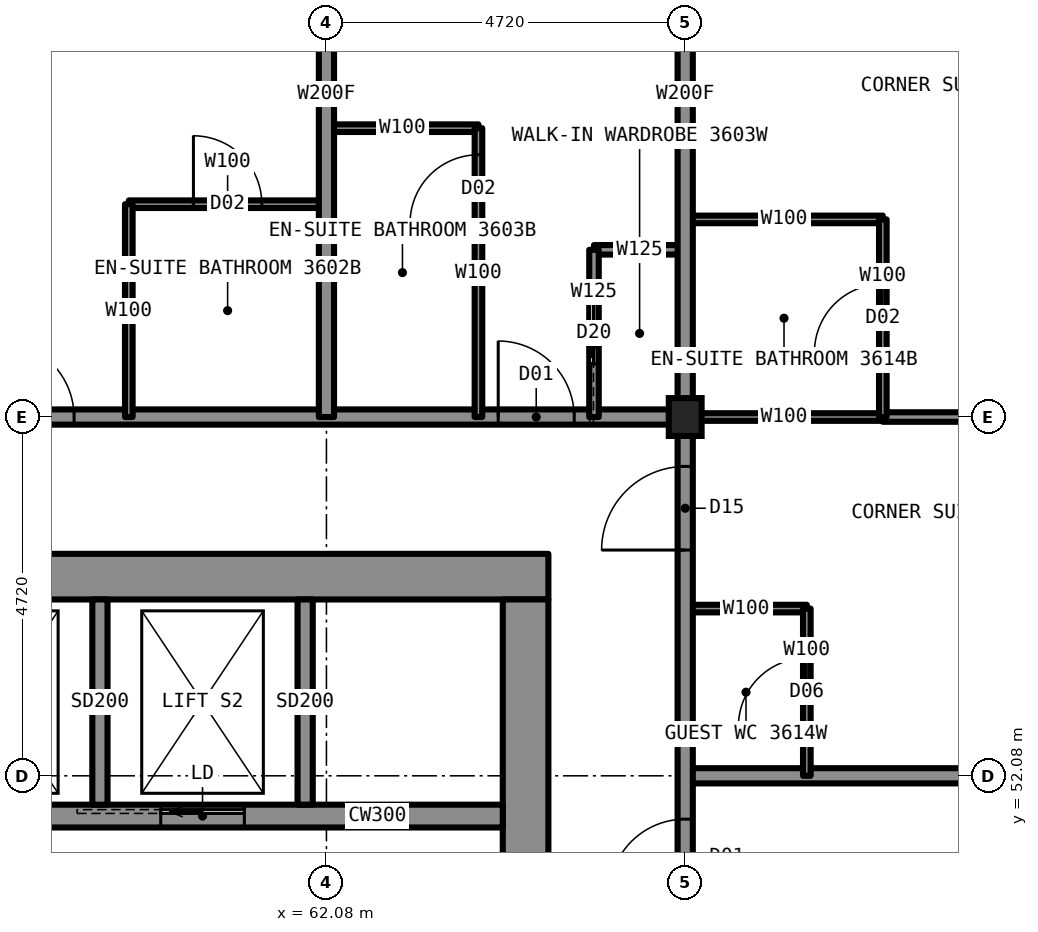
"""IFC4 building model, lengths in metres.
Left out: names, types, materials, properties, quantities, classifications, styles, units other than length and angle.
Written with IfcOpenShell. Run it as: python <this file> out.ifc"""

import sys

from ifc_helpers import new_model, si_unit, direction, frame, frame_2d, origin, origin_2d, place, context, subcontext, project, spatial, rectangle, i_section, extrude, element, fill, save


model = new_model("IFC4")
c1 = context("Model", 3, precision=1e-05, world=origin(), true_north=direction((0.0, 1.0)))
c2 = subcontext(c1, "Body", "Model", "MODEL_VIEW")
j1 = project(units=[si_unit("LENGTHUNIT", "METRE"), si_unit("PLANEANGLEUNIT", "RADIAN")], contexts=[c1])
p1 = place(None, origin())
s1 = spatial("IfcSite", under=j1, at=p1, CompositionType="ELEMENT")
p2 = place(p1, origin())
s2 = spatial("IfcBuilding", under=s1, at=p2, CompositionType="ELEMENT")
p3 = place(p2, frame((0.0, 0.0, 135.4)))
s3 = spatial("IfcBuildingStorey", under=s2, at=p3, CompositionType="ELEMENT", Elevation=135.4)
p4 = place(p3, frame((66.8, 56.8, 0.0), z_axis=(0.0, 0.0, 1.0), x_axis=(1.0, 0.0, 0.0)))
e1 = element("IfcColumn", 1, at=p4, inside=s3, PredefinedType="COLUMN", context=c2, shape_type="SweptSolid", body=[
    extrude(i_section(OverallWidth=0.432, OverallDepth=0.498, WebThickness=0.056, FlangeThickness=0.089, at=origin_2d()), origin(), (0.0, 0.0, 1.0), 3.5),
])
p5 = place(p3, frame((45.0, 54.7, 0.0), z_axis=(0.0, 0.0, 1.0), x_axis=(1.0, 0.0, 0.0)))
e2 = element("IfcWall", 2, at=p5, inside=s3, PredefinedType="SHEAR", context=c2, shape_type="SweptSolid", body=[
    extrude(rectangle(XDim=20.0, YDim=0.6, at=frame_2d((10.0, 0.0))), origin(), (0.0, 0.0, 1.0), 3.5),
])
p6 = place(p3, frame((64.7, 35.6, 0.0), z_axis=(0.0, 0.0, 1.0), x_axis=(0.0, 1.0, 0.0)))
e3 = element("IfcWall", 3, at=p6, inside=s3, PredefinedType="SHEAR", context=c2, shape_type="SweptSolid", body=[
    extrude(rectangle(XDim=18.8, YDim=0.6, at=frame_2d((9.4, 0.0))), origin(), (0.0, 0.0, 1.0), 3.5),
])
p7 = place(p6, frame((13.4, 0.0, 0.0)))
e4 = element("IfcOpeningElement", 4, at=p7, cuts=e3, PredefinedType="OPENING", context=c2, shape_type="SweptSolid", body=[
    extrude(rectangle(XDim=1.8, YDim=2.2, at=frame_2d((0.9, 1.1))), frame((0.0, 0.31, 0.0), z_axis=(0.0, -1.0, 0.0), x_axis=(1.0, 0.0, 0.0)), (0.0, 0.0, 1.0), 0.62),
])
p8 = place(p6, frame((3.6, 0.0, 0.0)))
e5 = element("IfcOpeningElement", 5, at=p8, cuts=e3, PredefinedType="OPENING", context=c2, shape_type="SweptSolid", body=[
    extrude(rectangle(XDim=1.8, YDim=2.2, at=frame_2d((0.9, 1.1))), frame((0.0, 0.31, 0.0), z_axis=(0.0, -1.0, 0.0), x_axis=(1.0, 0.0, 0.0)), (0.0, 0.0, 1.0), 0.62),
])
p9 = place(p3, frame((45.6, 51.55, 0.0), z_axis=(0.0, 0.0, 1.0), x_axis=(1.0, 0.0, 0.0)))
e6 = element("IfcWall", 6, at=p9, inside=s3, PredefinedType="SHEAR", context=c2, shape_type="SweptSolid", body=[
    extrude(rectangle(XDim=18.8, YDim=0.3, at=frame_2d((9.4, 0.0))), origin(), (0.0, 0.0, 1.0), 3.5),
])
p10 = place(p9, frame((0.7, 0.0, 0.0)))
e7 = element("IfcOpeningElement", 7, at=p10, cuts=e6, PredefinedType="OPENING", context=c2, shape_type="SweptSolid", body=[
    extrude(rectangle(XDim=1.1, YDim=2.2, at=frame_2d((0.55, 1.1))), frame((0.0, 0.16, 0.0), z_axis=(0.0, -1.0, 0.0), x_axis=(1.0, 0.0, 0.0)), (0.0, 0.0, 1.0), 0.32),
])
p11 = place(p9, frame((3.4, 0.0, 0.0)))
e8 = element("IfcOpeningElement", 8, at=p11, cuts=e6, PredefinedType="OPENING", context=c2, shape_type="SweptSolid", body=[
    extrude(rectangle(XDim=1.1, YDim=2.2, at=frame_2d((0.55, 1.1))), frame((0.0, 0.16, 0.0), z_axis=(0.0, -1.0, 0.0), x_axis=(1.0, 0.0, 0.0)), (0.0, 0.0, 1.0), 0.32),
])
p12 = place(p9, frame((6.1, 0.0, 0.0)))
e9 = element("IfcOpeningElement", 9, at=p12, cuts=e6, PredefinedType="OPENING", context=c2, shape_type="SweptSolid", body=[
    extrude(rectangle(XDim=1.1, YDim=2.2, at=frame_2d((0.55, 1.1))), frame((0.0, 0.16, 0.0), z_axis=(0.0, -1.0, 0.0), x_axis=(1.0, 0.0, 0.0)), (0.0, 0.0, 1.0), 0.32),
])
p13 = place(p9, frame((8.8, 0.0, 0.0)))
e10 = element("IfcOpeningElement", 10, at=p13, cuts=e6, PredefinedType="OPENING", context=c2, shape_type="SweptSolid", body=[
    extrude(rectangle(XDim=1.1, YDim=2.2, at=frame_2d((0.55, 1.1))), frame((0.0, 0.16, 0.0), z_axis=(0.0, -1.0, 0.0), x_axis=(1.0, 0.0, 0.0)), (0.0, 0.0, 1.0), 0.32),
])
p14 = place(p9, frame((11.6, 0.0, 0.0)))
e11 = element("IfcOpeningElement", 11, at=p14, cuts=e6, PredefinedType="OPENING", context=c2, shape_type="SweptSolid", body=[
    extrude(rectangle(XDim=1.1, YDim=2.2, at=frame_2d((0.55, 1.1))), frame((0.0, 0.16, 0.0), z_axis=(0.0, -1.0, 0.0), x_axis=(1.0, 0.0, 0.0)), (0.0, 0.0, 1.0), 0.32),
])
p15 = place(p9, frame((14.3, 0.0, 0.0)))
e12 = element("IfcOpeningElement", 12, at=p15, cuts=e6, PredefinedType="OPENING", context=c2, shape_type="SweptSolid", body=[
    extrude(rectangle(XDim=1.1, YDim=2.2, at=frame_2d((0.55, 1.1))), frame((0.0, 0.16, 0.0), z_axis=(0.0, -1.0, 0.0), x_axis=(1.0, 0.0, 0.0)), (0.0, 0.0, 1.0), 0.32),
])
p16 = place(p3, frame((66.8, 56.8, 0.0), z_axis=(0.0, 0.0, 1.0), x_axis=(1.0, 0.0, 0.0)))
e13 = element("IfcWall", 13, at=p16, inside=s3, PredefinedType="PARTITIONING", context=c2, shape_type="SweptSolid", body=[
    extrude(rectangle(XDim=2.6, YDim=0.1, at=frame_2d((1.3, 0.0))), origin(), (0.0, 0.0, 1.0), 2.573),
])
p17 = place(p3, frame((43.2, 56.8, 0.0), z_axis=(0.0, 0.0, 1.0), x_axis=(1.0, 0.0, 0.0)))
e14 = element("IfcWall", 14, at=p17, inside=s3, PredefinedType="PARTITIONING", context=c2, shape_type="SweptSolid", body=[
    extrude(rectangle(XDim=23.6, YDim=0.2, at=frame_2d((11.8, 0.0))), origin(), (0.0, 0.0, 1.0), 3.33),
])
p18 = place(p17, frame((1.85, 0.0, 0.0)))
e15 = element("IfcOpeningElement", 15, at=p18, cuts=e14, PredefinedType="OPENING", context=c2, shape_type="SweptSolid", body=[
    extrude(rectangle(XDim=1.1, YDim=2.2, at=frame_2d((0.55, 1.1))), frame((0.0, 0.11, 0.0), z_axis=(0.0, -1.0, 0.0), x_axis=(1.0, 0.0, 0.0)), (0.0, 0.0, 1.0), 0.22),
])
p19 = place(p17, frame((14.56, 0.0, 0.0)))
e16 = element("IfcOpeningElement", 16, at=p19, cuts=e14, PredefinedType="OPENING", context=c2, shape_type="SweptSolid", body=[
    extrude(rectangle(XDim=1.0, YDim=2.2, at=frame_2d((0.5, 1.1))), frame((0.0, 0.11, 0.0), z_axis=(0.0, -1.0, 0.0), x_axis=(1.0, 0.0, 0.0)), (0.0, 0.0, 1.0), 0.22),
])
p20 = place(p17, frame((21.14, 0.0, 0.0)))
e17 = element("IfcOpeningElement", 17, at=p20, cuts=e14, PredefinedType="OPENING", context=c2, shape_type="SweptSolid", body=[
    extrude(rectangle(XDim=1.0, YDim=2.2, at=frame_2d((0.5, 1.1))), frame((0.0, 0.11, 0.0), z_axis=(0.0, -1.0, 0.0), x_axis=(1.0, 0.0, 0.0)), (0.0, 0.0, 1.0), 0.22),
])
p21 = place(p3, frame((69.4, 56.8, 0.0), z_axis=(0.0, 0.0, 1.0), x_axis=(1.0, 0.0, 0.0)))
e18 = element("IfcWall", 18, at=p21, inside=s3, PredefinedType="PARTITIONING", context=c2, shape_type="SweptSolid", body=[
    extrude(rectangle(XDim=5.9, YDim=0.125, at=frame_2d((2.95, 0.0))), origin(), (0.0, 0.0, 1.0), 2.573),
])
p22 = place(p21, frame((1.15, 0.0, 0.0)))
e19 = element("IfcOpeningElement", 19, at=p22, cuts=e18, PredefinedType="OPENING", context=c2, shape_type="SweptSolid", body=[
    extrude(rectangle(XDim=0.9, YDim=2.2, at=frame_2d((0.45, 1.1))), frame((0.0, 0.073, 0.0), z_axis=(0.0, -1.0, 0.0), x_axis=(1.0, 0.0, 0.0)), (0.0, 0.0, 1.0), 0.145),
])
p23 = place(p3, frame((65.6, 59.0, 0.0), z_axis=(0.0, 0.0, 1.0), x_axis=(1.0, 0.0, 0.0)))
e20 = element("IfcWall", 20, at=p23, inside=s3, PredefinedType="PARTITIONING", context=c2, shape_type="SweptSolid", body=[
    extrude(rectangle(XDim=1.2, YDim=0.125, at=frame_2d((0.6, 0.0))), origin(), (0.0, 0.0, 1.0), 3.33),
])
p24 = place(p3, frame((66.8, 59.4, 0.0), z_axis=(0.0, 0.0, 1.0), x_axis=(1.0, 0.0, 0.0)))
e21 = element("IfcWall", 21, at=p24, inside=s3, PredefinedType="PARTITIONING", context=c2, shape_type="SweptSolid", body=[
    extrude(rectangle(XDim=2.6, YDim=0.1, at=frame_2d((1.3, 0.0))), origin(), (0.0, 0.0, 1.0), 3.33),
])
p25 = place(p3, frame((59.48, 59.6, 0.0), z_axis=(0.0, 0.0, 1.0), x_axis=(1.0, 0.0, 0.0)))
e22 = element("IfcWall", 22, at=p25, inside=s3, PredefinedType="PARTITIONING", context=c2, shape_type="SweptSolid", body=[
    extrude(rectangle(XDim=2.6, YDim=0.1, at=frame_2d((1.3, 0.0))), origin(), (0.0, 0.0, 1.0), 3.33),
])
p26 = place(p25, frame((0.85, 0.0, 0.0)))
e23 = element("IfcOpeningElement", 23, at=p26, cuts=e22, PredefinedType="OPENING", context=c2, shape_type="SweptSolid", body=[
    extrude(rectangle(XDim=0.9, YDim=2.1, at=frame_2d((0.45, 1.05))), frame((0.0, 0.06, 0.0), z_axis=(0.0, -1.0, 0.0), x_axis=(1.0, 0.0, 0.0)), (0.0, 0.0, 1.0), 0.12),
])
p27 = place(p3, frame((62.08, 60.6, 0.0), z_axis=(0.0, 0.0, 1.0), x_axis=(1.0, 0.0, 0.0)))
e24 = element("IfcWall", 24, at=p27, inside=s3, PredefinedType="PARTITIONING", context=c2, shape_type="SweptSolid", body=[
    extrude(rectangle(XDim=2.0, YDim=0.1, at=frame_2d((1.0, 0.0))), origin(), (0.0, 0.0, 1.0), 3.33),
])
p28 = place(p3, frame((66.8, 52.08, 0.0), z_axis=(0.0, 0.0, 1.0), x_axis=(1.0, 0.0, 0.0)))
e25 = element("IfcWall", 25, at=p28, inside=s3, PredefinedType="PARTITIONING", context=c2, shape_type="SweptSolid", body=[
    extrude(rectangle(XDim=8.5, YDim=0.2, at=frame_2d((4.25, 0.0))), origin(), (0.0, 0.0, 1.0), 2.573),
])
p29 = place(p3, frame((66.8, 54.28, 0.0), z_axis=(0.0, 0.0, 1.0), x_axis=(1.0, 0.0, 0.0)))
e26 = element("IfcWall", 26, at=p29, inside=s3, PredefinedType="PARTITIONING", context=c2, shape_type="SweptSolid", body=[
    extrude(rectangle(XDim=1.6, YDim=0.1, at=frame_2d((0.8, 0.0))), origin(), (0.0, 0.0, 1.0), 3.33),
])
p30 = place(p3, frame((65.6, 56.8, 0.0), z_axis=(0.0, 0.0, 1.0), x_axis=(0.0, 1.0, 0.0)))
e27 = element("IfcWall", 27, at=p30, inside=s3, PredefinedType="PARTITIONING", context=c2, shape_type="SweptSolid", body=[
    extrude(rectangle(XDim=2.2, YDim=0.125, at=frame_2d((1.1, 0.0))), origin(), (0.0, 0.0, 1.0), 3.33),
])
p31 = place(p30, frame((0.7, 0.0, 0.0)))
e28 = element("IfcOpeningElement", 28, at=p31, cuts=e27, PredefinedType="OPENING", context=c2, shape_type="SweptSolid", body=[
    extrude(rectangle(XDim=0.8, YDim=2.1, at=frame_2d((0.4, 1.05))), frame((0.0, 0.073, 0.0), z_axis=(0.0, -1.0, 0.0), x_axis=(1.0, 0.0, 0.0)), (0.0, 0.0, 1.0), 0.145),
])
p32 = place(p3, frame((66.8, 33.2, 0.0), z_axis=(0.0, 0.0, 1.0), x_axis=(0.0, 1.0, 0.0)))
e29 = element("IfcWall", 29, at=p32, inside=s3, PredefinedType="PARTITIONING", context=c2, shape_type="SweptSolid", body=[
    extrude(rectangle(XDim=23.6, YDim=0.2, at=frame_2d((11.8, 0.0))), origin(), (0.0, 0.0, 1.0), 3.33),
])
p33 = place(p32, frame((7.27, 0.0, 0.0)))
e30 = element("IfcOpeningElement", 30, at=p33, cuts=e29, PredefinedType="OPENING", context=c2, shape_type="SweptSolid", body=[
    extrude(rectangle(XDim=1.0, YDim=2.2, at=frame_2d((0.5, 1.1))), frame((0.0, 0.11, 0.0), z_axis=(0.0, -1.0, 0.0), x_axis=(1.0, 0.0, 0.0)), (0.0, 0.0, 1.0), 0.22),
])
p34 = place(p32, frame((11.99, 0.0, 0.0)))
e31 = element("IfcOpeningElement", 31, at=p34, cuts=e29, PredefinedType="OPENING", context=c2, shape_type="SweptSolid", body=[
    extrude(rectangle(XDim=1.0, YDim=2.2, at=frame_2d((0.5, 1.1))), frame((0.0, 0.11, 0.0), z_axis=(0.0, -1.0, 0.0), x_axis=(1.0, 0.0, 0.0)), (0.0, 0.0, 1.0), 0.22),
])
p35 = place(p32, frame((17.31, 0.0, 0.0)))
e32 = element("IfcOpeningElement", 32, at=p35, cuts=e29, PredefinedType="OPENING", context=c2, shape_type="SweptSolid", body=[
    extrude(rectangle(XDim=1.0, YDim=2.2, at=frame_2d((0.5, 1.1))), frame((0.0, 0.11, 0.0), z_axis=(0.0, -1.0, 0.0), x_axis=(1.0, 0.0, 0.0)), (0.0, 0.0, 1.0), 0.22),
])
p36 = place(p32, frame((21.85, 0.0, 0.0)))
e33 = element("IfcOpeningElement", 33, at=p36, cuts=e29, PredefinedType="OPENING", context=c2, shape_type="SweptSolid", body=[
    extrude(rectangle(XDim=1.1, YDim=2.2, at=frame_2d((0.55, 1.1))), frame((0.0, 0.11, 0.0), z_axis=(0.0, -1.0, 0.0), x_axis=(1.0, 0.0, 0.0)), (0.0, 0.0, 1.0), 0.22),
])
p37 = place(p32, frame((0.65, 0.0, 0.0)))
e34 = element("IfcOpeningElement", 34, at=p37, cuts=e29, PredefinedType="OPENING", context=c2, shape_type="SweptSolid", body=[
    extrude(rectangle(XDim=1.1, YDim=2.2, at=frame_2d((0.55, 1.1))), frame((0.0, 0.11, 0.0), z_axis=(0.0, -1.0, 0.0), x_axis=(1.0, 0.0, 0.0)), (0.0, 0.0, 1.0), 0.22),
])
p38 = place(p3, frame((66.8, 56.8, 0.0), z_axis=(0.0, 0.0, 1.0), x_axis=(0.0, 1.0, 0.0)))
e35 = element("IfcWall", 35, at=p38, inside=s3, PredefinedType="PARTITIONING", context=c2, shape_type="SweptSolid", body=[
    extrude(rectangle(XDim=8.5, YDim=0.2, at=frame_2d((4.25, 0.0))), origin(), (0.0, 0.0, 1.0), 2.573),
])
p39 = place(p3, frame((68.4, 52.08, 0.0), z_axis=(0.0, 0.0, 1.0), x_axis=(0.0, 1.0, 0.0)))
e36 = element("IfcWall", 36, at=p39, inside=s3, PredefinedType="PARTITIONING", context=c2, shape_type="SweptSolid", body=[
    extrude(rectangle(XDim=2.2, YDim=0.1, at=frame_2d((1.1, 0.0))), origin(), (0.0, 0.0, 1.0), 3.33),
])
p40 = place(p39, frame((0.65, 0.0, 0.0)))
e37 = element("IfcOpeningElement", 37, at=p40, cuts=e36, PredefinedType="OPENING", context=c2, shape_type="SweptSolid", body=[
    extrude(rectangle(XDim=0.9, YDim=2.1, at=frame_2d((0.45, 1.05))), frame((0.0, 0.06, 0.0), z_axis=(0.0, -1.0, 0.0), x_axis=(1.0, 0.0, 0.0)), (0.0, 0.0, 1.0), 0.12),
])
p41 = place(p3, frame((69.4, 56.8, 0.0), z_axis=(0.0, 0.0, 1.0), x_axis=(0.0, 1.0, 0.0)))
e38 = element("IfcWall", 38, at=p41, inside=s3, PredefinedType="PARTITIONING", context=c2, shape_type="SweptSolid", body=[
    extrude(rectangle(XDim=2.6, YDim=0.1, at=frame_2d((1.3, 0.0))), origin(), (0.0, 0.0, 1.0), 3.33),
])
p42 = place(p41, frame((0.85, 0.0, 0.0)))
e39 = element("IfcOpeningElement", 39, at=p42, cuts=e38, PredefinedType="OPENING", context=c2, shape_type="SweptSolid", body=[
    extrude(rectangle(XDim=0.9, YDim=2.1, at=frame_2d((0.45, 1.05))), frame((0.0, 0.06, 0.0), z_axis=(0.0, -1.0, 0.0), x_axis=(1.0, 0.0, 0.0)), (0.0, 0.0, 1.0), 0.12),
])
p43 = place(p3, frame((59.48, 56.8, 0.0), z_axis=(0.0, 0.0, 1.0), x_axis=(0.0, 1.0, 0.0)))
e40 = element("IfcWall", 40, at=p43, inside=s3, PredefinedType="PARTITIONING", context=c2, shape_type="SweptSolid", body=[
    extrude(rectangle(XDim=2.8, YDim=0.1, at=frame_2d((1.4, 0.0))), origin(), (0.0, 0.0, 1.0), 3.33),
])
p44 = place(p3, frame((62.08, 56.8, 0.0), z_axis=(0.0, 0.0, 1.0), x_axis=(0.0, 1.0, 0.0)))
e41 = element("IfcWall", 41, at=p44, inside=s3, PredefinedType="PARTITIONING", context=c2, shape_type="SweptSolid", body=[
    extrude(rectangle(XDim=8.5, YDim=0.2, at=frame_2d((4.25, 0.0))), origin(), (0.0, 0.0, 1.0), 2.573),
])
p45 = place(p3, frame((64.08, 56.8, 0.0), z_axis=(0.0, 0.0, 1.0), x_axis=(0.0, 1.0, 0.0)))
e42 = element("IfcWall", 42, at=p45, inside=s3, PredefinedType="PARTITIONING", context=c2, shape_type="SweptSolid", body=[
    extrude(rectangle(XDim=3.8, YDim=0.1, at=frame_2d((1.9, 0.0))), origin(), (0.0, 0.0, 1.0), 3.33),
])
p46 = place(p45, frame((2.55, 0.0, 0.0)))
e43 = element("IfcOpeningElement", 43, at=p46, cuts=e42, PredefinedType="OPENING", context=c2, shape_type="SweptSolid", body=[
    extrude(rectangle(XDim=0.9, YDim=2.1, at=frame_2d((0.45, 1.05))), frame((0.0, 0.06, 0.0), z_axis=(0.0, -1.0, 0.0), x_axis=(1.0, 0.0, 0.0)), (0.0, 0.0, 1.0), 0.12),
])
for number, where, z_axis, x_axis in (
    (44, (59.1, 51.7, 0.0), (0.0, 0.0, 1.0), (0.0, 1.0, 0.0)),
    (45, (61.8, 51.7, 0.0), (0.0, 0.0, 1.0), (0.0, 1.0, 0.0)),
):
    element("IfcWall", number, at=place(p3, frame(where, z_axis=z_axis, x_axis=x_axis)), inside=s3, PredefinedType="PARTITIONING", context=c2, shape_type="SweptSolid", body=[
        extrude(rectangle(XDim=2.7, YDim=0.2, at=frame_2d((1.35, 0.0))), origin(), (0.0, 0.0, 1.0), 3.33),
    ])
p47 = place(p19, origin())
e46 = element("IfcDoor", 46, at=p47, inside=s3, OperationType="SINGLE_SWING_LEFT", PredefinedType="DOOR", context=c2, shape_type="SweptSolid", body=[
    extrude(rectangle(XDim=1.0, YDim=2.2, at=frame_2d((0.5, 1.1))), frame((0.0, 0.025, 0.0), z_axis=(0.0, -1.0, 0.0), x_axis=(1.0, 0.0, 0.0)), (0.0, 0.0, 1.0), 0.05),
])
fill(e16, e46)
p48 = place(p26, origin())
e47 = element("IfcDoor", 47, at=p48, inside=s3, OperationType="SINGLE_SWING_RIGHT", PredefinedType="DOOR", context=c2, shape_type="SweptSolid", body=[
    extrude(rectangle(XDim=0.9, YDim=2.1, at=frame_2d((0.45, 1.05))), frame((0.0, 0.025, 0.0), z_axis=(0.0, -1.0, 0.0), x_axis=(1.0, 0.0, 0.0)), (0.0, 0.0, 1.0), 0.05),
])
fill(e23, e47)
p49 = place(p20, origin())
e48 = element("IfcDoor", 48, at=p49, inside=s3, OperationType="SINGLE_SWING_LEFT", PredefinedType="DOOR", context=c2, shape_type="SweptSolid", body=[
    extrude(rectangle(XDim=1.0, YDim=2.2, at=frame_2d((0.5, 1.1))), frame((0.0, 0.025, 0.0), z_axis=(0.0, -1.0, 0.0), x_axis=(1.0, 0.0, 0.0)), (0.0, 0.0, 1.0), 0.05),
])
fill(e17, e48)
p50 = place(p46, origin())
e49 = element("IfcDoor", 49, at=p50, inside=s3, OperationType="SINGLE_SWING_RIGHT", PredefinedType="DOOR", context=c2, shape_type="SweptSolid", body=[
    extrude(rectangle(XDim=0.9, YDim=2.1, at=frame_2d((0.45, 1.05))), frame((0.0, 0.025, 0.0), z_axis=(0.0, -1.0, 0.0), x_axis=(1.0, 0.0, 0.0)), (0.0, 0.0, 1.0), 0.05),
])
fill(e43, e49)
p51 = place(p31, origin())
e50 = element("IfcDoor", 50, at=p51, inside=s3, OperationType="SLIDING_TO_LEFT", PredefinedType="DOOR", context=c2, shape_type="SweptSolid", body=[
    extrude(rectangle(XDim=0.8, YDim=2.1, at=frame_2d((0.4, 1.05))), frame((0.0, 0.025, 0.0), z_axis=(0.0, -1.0, 0.0), x_axis=(1.0, 0.0, 0.0)), (0.0, 0.0, 1.0), 0.05),
])
fill(e28, e50)
p52 = place(p35, origin())
e51 = element("IfcDoor", 51, at=p52, inside=s3, OperationType="SINGLE_SWING_LEFT", PredefinedType="DOOR", context=c2, shape_type="SweptSolid", body=[
    extrude(rectangle(XDim=1.0, YDim=2.2, at=frame_2d((0.5, 1.1))), frame((0.0, 0.025, 0.0), z_axis=(0.0, -1.0, 0.0), x_axis=(1.0, 0.0, 0.0)), (0.0, 0.0, 1.0), 0.05),
])
fill(e32, e51)
p53 = place(p36, origin())
e52 = element("IfcDoor", 52, at=p53, inside=s3, OperationType="SINGLE_SWING_LEFT", PredefinedType="DOOR", context=c2, shape_type="SweptSolid", body=[
    extrude(rectangle(XDim=1.1, YDim=2.2, at=frame_2d((0.55, 1.1))), frame((0.0, 0.025, 0.0), z_axis=(0.0, -1.0, 0.0), x_axis=(1.0, 0.0, 0.0)), (0.0, 0.0, 1.0), 0.05),
])
fill(e33, e52)
p54 = place(p42, origin())
e53 = element("IfcDoor", 53, at=p54, inside=s3, OperationType="SINGLE_SWING_RIGHT", PredefinedType="DOOR", context=c2, shape_type="SweptSolid", body=[
    extrude(rectangle(XDim=0.9, YDim=2.1, at=frame_2d((0.45, 1.05))), frame((0.0, 0.025, 0.0), z_axis=(0.0, -1.0, 0.0), x_axis=(1.0, 0.0, 0.0)), (0.0, 0.0, 1.0), 0.05),
])
fill(e39, e53)
p55 = place(p40, origin())
e54 = element("IfcDoor", 54, at=p55, inside=s3, OperationType="SINGLE_SWING_LEFT", PredefinedType="DOOR", context=c2, shape_type="SweptSolid", body=[
    extrude(rectangle(XDim=0.9, YDim=2.1, at=frame_2d((0.45, 1.05))), frame((0.0, 0.025, 0.0), z_axis=(0.0, -1.0, 0.0), x_axis=(1.0, 0.0, 0.0)), (0.0, 0.0, 1.0), 0.05),
])
fill(e37, e54)
p56 = place(p15, origin())
e55 = element("IfcDoor", 55, at=p56, inside=s3, OperationType="SLIDING_TO_LEFT", PredefinedType="DOOR", context=c2, shape_type="SweptSolid", body=[
    extrude(rectangle(XDim=1.1, YDim=2.2, at=frame_2d((0.55, 1.1))), frame((0.0, 0.025, 0.0), z_axis=(0.0, -1.0, 0.0), x_axis=(1.0, 0.0, 0.0)), (0.0, 0.0, 1.0), 0.05),
])
fill(e12, e55)
save(model, sys.argv[1])
